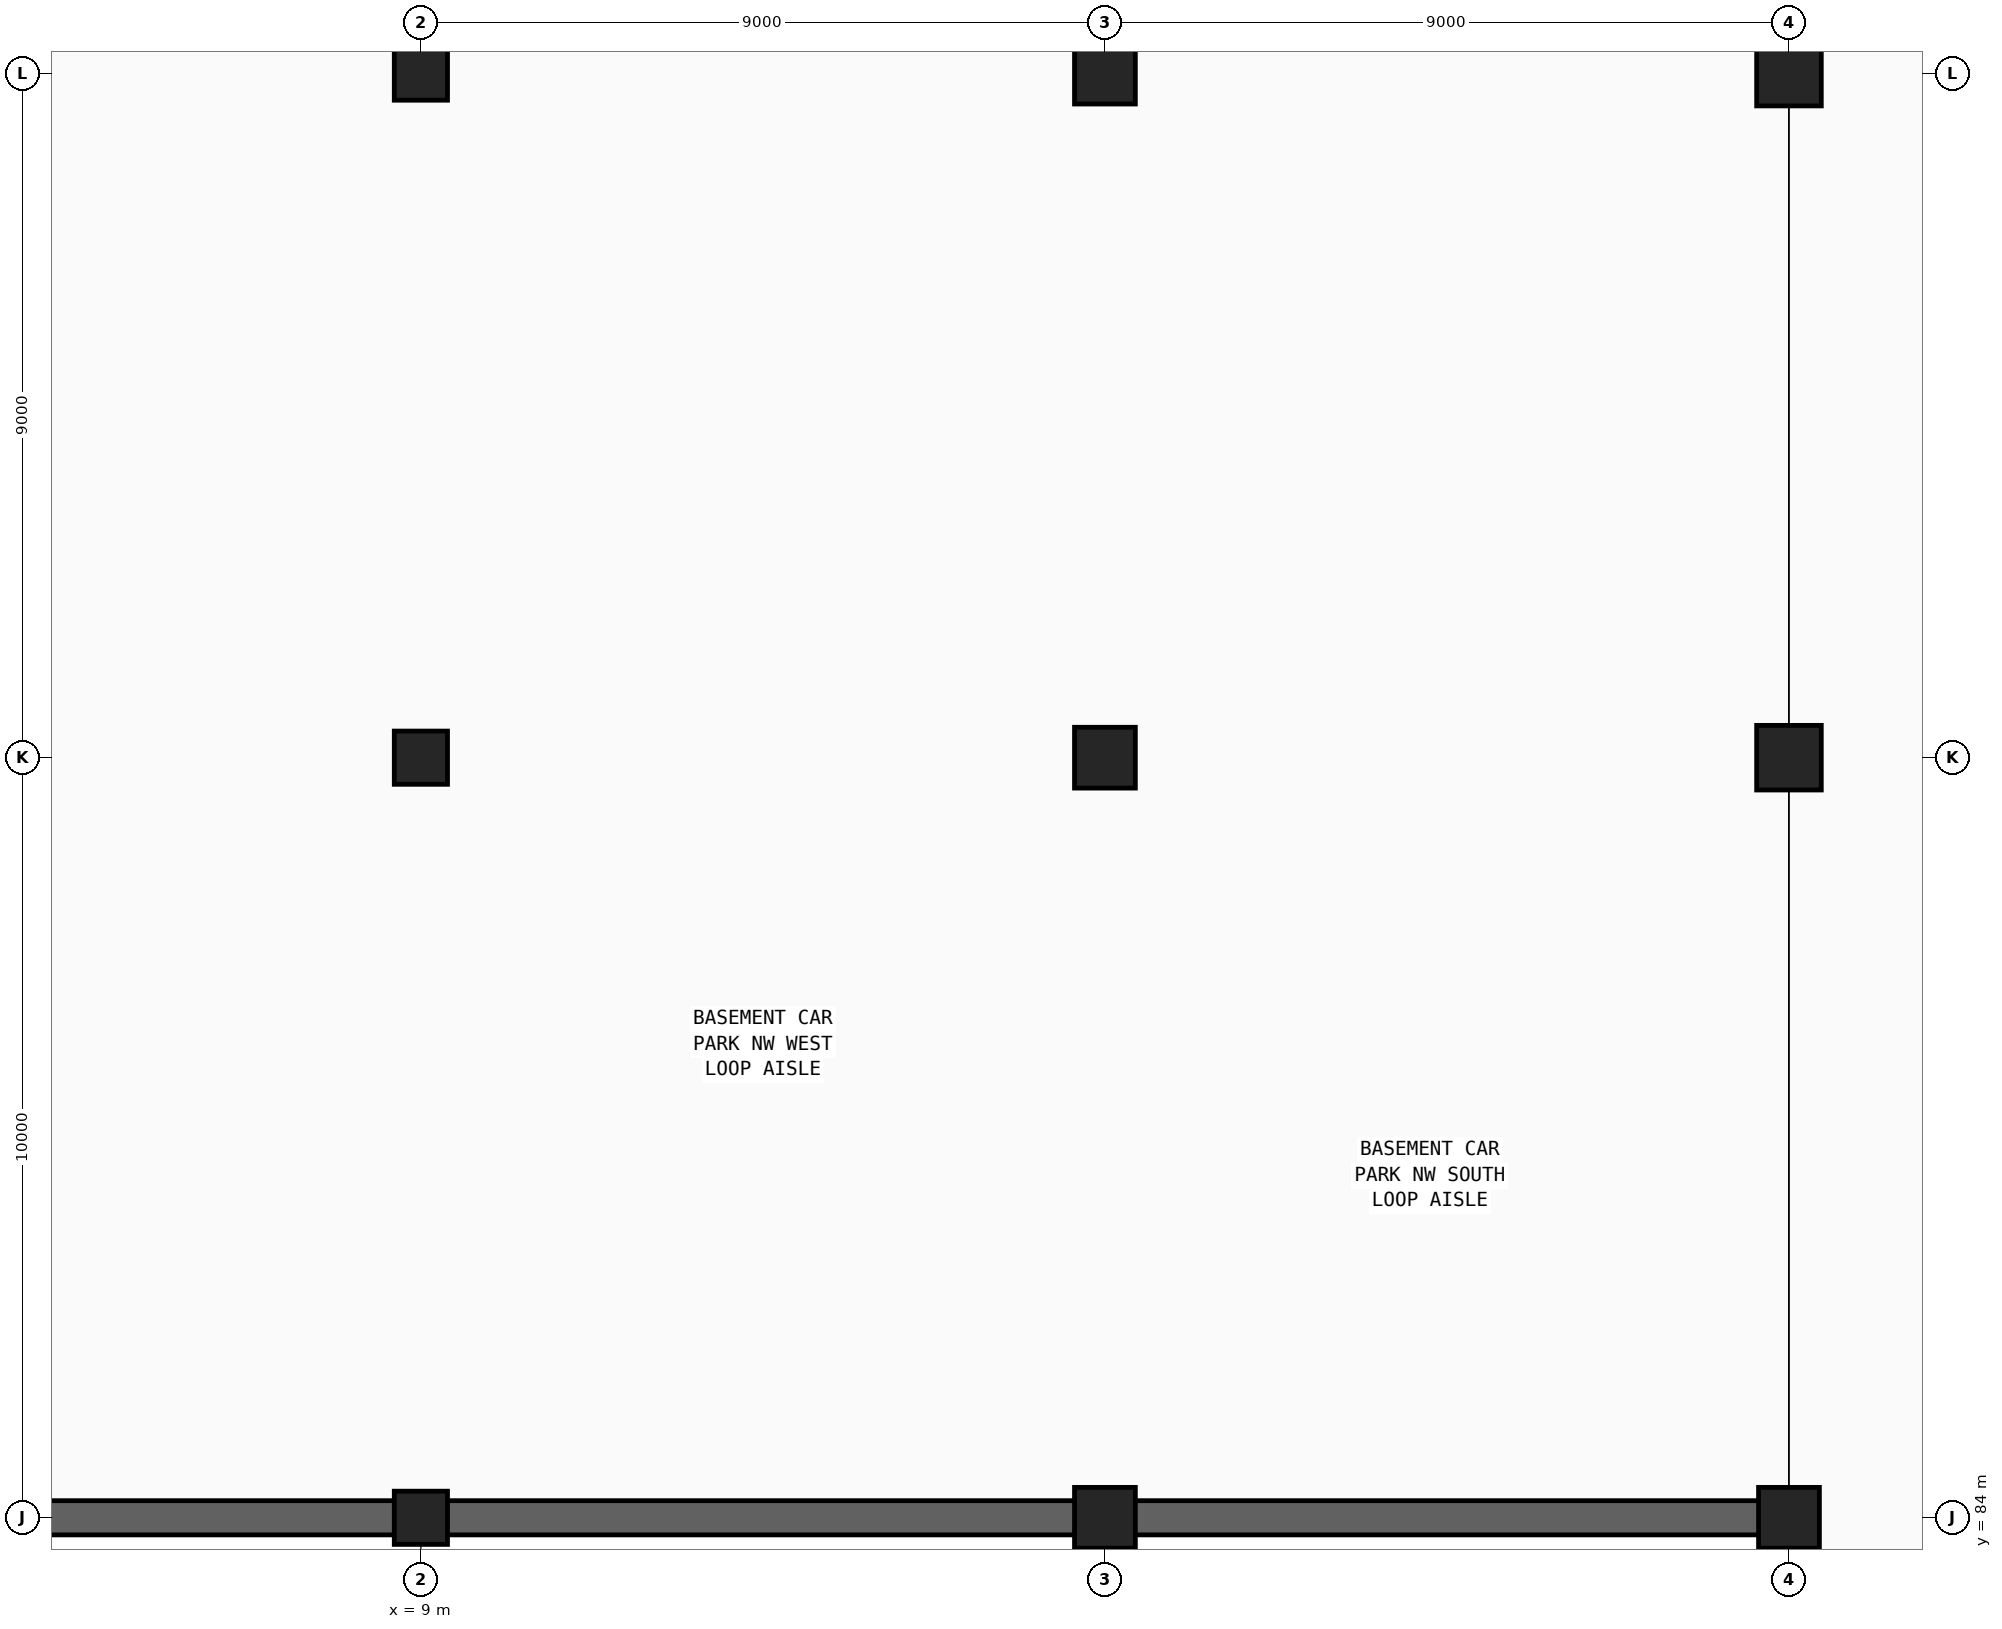
"""IFC4 building model, lengths in metres.
Left out: names, types, materials, properties, quantities, classifications, styles, units other than length and angle.
Written with IfcOpenShell. Run it as: python <this file> out.ifc"""

import sys

from ifc_helpers import new_model, si_unit, direction, frame, frame_2d, origin, origin_2d, place, context, subcontext, project, spatial, rectangle, extrude, element, save


model = new_model("IFC4")
c1 = context("Model", 3, precision=1e-05, world=origin(), true_north=direction((0.0, 1.0)))
c2 = subcontext(c1, "Body", "Model", "MODEL_VIEW")
j1 = project(units=[si_unit("LENGTHUNIT", "METRE"), si_unit("PLANEANGLEUNIT", "RADIAN")], contexts=[c1])
p1 = place(None, origin())
s1 = spatial("IfcSite", under=j1, at=p1, CompositionType="ELEMENT")
p2 = place(p1, origin())
s2 = spatial("IfcBuilding", under=s1, at=p2, CompositionType="ELEMENT")
p3 = place(p2, frame((0.0, 0.0, -5.1)))
s3 = spatial("IfcBuildingStorey", under=s2, at=p3, CompositionType="ELEMENT", Elevation=-5.1)
for number, where, z_axis, x_axis in (
    (1, (9.0, 84.0, 0.0), (0.0, 0.0, 1.0), (1.0, 0.0, 0.0)),
    (2, (9.0, 94.0, 0.0), (0.0, 0.0, 1.0), (1.0, 0.0, 0.0)),
    (3, (9.0, 103.0, 0.0), (0.0, 0.0, 1.0), (1.0, 0.0, 0.0)),
):
    element("IfcColumn", number, at=place(p3, frame(where, z_axis=z_axis, x_axis=x_axis)), inside=s3, PredefinedType="COLUMN", context=c2, shape_type="SweptSolid", body=[
        extrude(rectangle(XDim=0.7, YDim=0.7, at=origin_2d()), origin(), (0.0, 0.0, 1.0), 5.1),
    ])
for number, where, z_axis, x_axis in (
    (4, (18.0, 84.0, 0.0), (0.0, 0.0, 1.0), (1.0, 0.0, 0.0)),
    (5, (18.0, 94.0, 0.0), (0.0, 0.0, 1.0), (1.0, 0.0, 0.0)),
    (6, (18.0, 103.0, 0.0), (0.0, 0.0, 1.0), (1.0, 0.0, 0.0)),
    (7, (27.0, 84.0, 0.0), (0.0, 0.0, 1.0), (1.0, 0.0, 0.0)),
):
    element("IfcColumn", number, at=place(p3, frame(where, z_axis=z_axis, x_axis=x_axis)), inside=s3, PredefinedType="COLUMN", context=c2, shape_type="SweptSolid", body=[
        extrude(rectangle(XDim=0.8, YDim=0.8, at=origin_2d()), origin(), (0.0, 0.0, 1.0), 5.1),
    ])
for number, where, z_axis, x_axis in (
    (8, (27.0, 94.0, 0.0), (0.0, 0.0, 1.0), (1.0, 0.0, 0.0)),
    (9, (27.0, 103.0, 0.0), (0.0, 0.0, 1.0), (1.0, 0.0, 0.0)),
):
    element("IfcColumn", number, at=place(p3, frame(where, z_axis=z_axis, x_axis=x_axis)), inside=s3, PredefinedType="COLUMN", context=c2, shape_type="SweptSolid", body=[
        extrude(rectangle(XDim=0.85, YDim=0.85, at=origin_2d()), origin(), (0.0, 0.0, 1.0), 5.1),
    ])
p4 = place(p3, frame((0.45, 84.0, 0.0), z_axis=(0.0, 0.0, 1.0), x_axis=(1.0, 0.0, 0.0)))
e10 = element("IfcWall", 10, at=p4, inside=s3, PredefinedType="SOLIDWALL", context=c2, shape_type="SweptSolid", body=[
    extrude(rectangle(XDim=26.55, YDim=0.45, at=frame_2d((13.275, 0.0))), origin(), (0.0, 0.0, 1.0), 5.1),
])
p5 = place(p3, frame((27.0, 28.225, 0.0), z_axis=(0.0, 0.0, 1.0), x_axis=(0.0, 1.0, 0.0)))
e11 = element("IfcWall", 11, at=p5, inside=s3, PredefinedType="SOLIDWALL", context=c2, shape_type="SweptSolid", body=[
    extrude(rectangle(XDim=55.55, YDim=0.45, at=frame_2d((27.775, 0.0))), origin(), (0.0, 0.0, 1.0), 5.1),
])
save(model, sys.argv[1])
